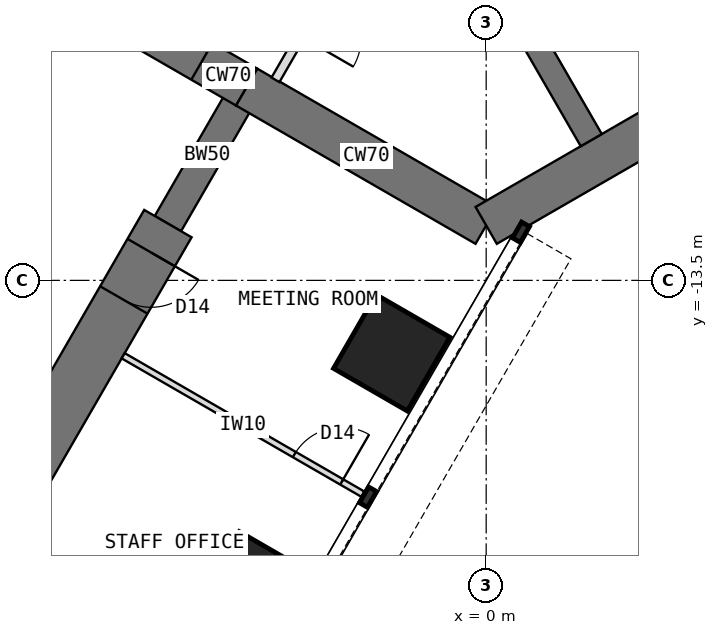
"""IFC4 building model, lengths in metres.
Left out: names, types, materials, properties, quantities, classifications, styles, units other than length and angle.
Written with IfcOpenShell. Run it as: python <this file> out.ifc"""

import sys

from ifc_helpers import new_model, si_unit, direction, frame, frame_2d, origin, origin_2d, place, context, subcontext, project, spatial, rectangle, extrude, element, fill, save


model = new_model("IFC4")
c1 = context("Model", 3, precision=1e-05, world=origin(), true_north=direction((0.0, 1.0)))
c2 = subcontext(c1, "Body", "Model", "MODEL_VIEW")
j1 = project(units=[si_unit("LENGTHUNIT", "METRE"), si_unit("PLANEANGLEUNIT", "RADIAN")], contexts=[c1])
p1 = place(None, origin())
s1 = spatial("IfcSite", under=j1, at=p1, CompositionType="ELEMENT")
p2 = place(p1, origin())
s2 = spatial("IfcBuilding", under=s1, at=p2, CompositionType="ELEMENT")
p3 = place(p2, frame((0.0, 0.0, 88.5)))
s3 = spatial("IfcBuildingStorey", under=s2, at=p3, CompositionType="ELEMENT", Elevation=88.5)
p4 = place(p3, frame((-6.97, -8.572, 0.0), z_axis=(0.0, 0.0, 1.0), x_axis=(0.866019471182, -0.500010275428, 0.0)))
e1 = element("IfcWall", 1, at=p4, inside=s3, PredefinedType="SHEAR", context=c2, shape_type="SweptSolid", body=[
    extrude(rectangle(XDim=3.5, YDim=0.7, at=frame_2d((1.75, 0.0))), origin(), (0.0, 0.0, 1.0), 4.0),
])
p5 = place(p4, frame((0.85, 0.0, 0.0)))
e2 = element("IfcOpeningElement", 2, at=p5, cuts=e1, PredefinedType="OPENING", context=c2, shape_type="SweptSolid", body=[
    extrude(rectangle(XDim=1.8, YDim=2.1, at=frame_2d((0.9, 1.05))), frame((0.0, 0.36, 0.0), z_axis=(0.0, -1.0, 0.0), x_axis=(1.0, 0.0, 0.0)), (0.0, 0.0, 1.0), 0.72),
])
p6 = place(p3, frame((-3.939, -10.322, 0.0), z_axis=(0.0, 0.0, 1.0), x_axis=(0.866011268655, -0.500024481964, 0.0)))
e3 = element("IfcWall", 3, at=p6, inside=s3, PredefinedType="SHEAR", context=c2, shape_type="SweptSolid", body=[
    extrude(rectangle(XDim=4.548, YDim=0.7, at=frame_2d((2.274, 0.0))), origin(), (0.0, 0.0, 1.0), 4.0),
])
p7 = place(p3, frame((0.0, -12.596, 0.0), z_axis=(0.0, 0.0, 1.0), x_axis=(0.866021940709, 0.500005998175, 0.0)))
e4 = element("IfcWall", 4, at=p7, inside=s3, PredefinedType="SHEAR", context=c2, shape_type="SweptSolid", body=[
    extrude(rectangle(XDim=12.596, YDim=0.7, at=frame_2d((6.298, 0.0))), origin(), (0.0, 0.0, 1.0), 4.0),
])
p8 = place(p3, frame((-3.939, -10.322, 0.0), z_axis=(0.0, 0.0, 1.0), x_axis=(-0.499918158782, -0.866072649678, 0.0)))
e5 = element("IfcWall", 5, at=p8, inside=s3, PredefinedType="SHEAR", context=c2, shape_type="SweptSolid", body=[
    extrude(rectangle(XDim=2.592, YDim=0.5, at=frame_2d((1.296, 0.0))), origin(), (0.0, 0.0, 1.0), 4.0),
])
p9 = place(p3, frame((-5.234, -12.566, 0.0), z_axis=(0.0, 0.0, 1.0), x_axis=(-0.499997557548, -0.86602681393, 0.0)))
e6 = element("IfcWall", 6, at=p9, inside=s3, PredefinedType="SHEAR", context=c2, shape_type="SweptSolid", body=[
    extrude(rectangle(XDim=9.5, YDim=0.9, at=frame_2d((4.75, 0.0))), origin(), (0.0, 0.0, 1.0), 4.0),
])
p10 = place(p9, frame((0.55, 0.0, 0.0)))
e7 = element("IfcOpeningElement", 7, at=p10, cuts=e6, PredefinedType="OPENING", context=c2, shape_type="SweptSolid", body=[
    extrude(rectangle(XDim=0.9, YDim=2.1, at=frame_2d((0.45, 1.05))), frame((0.0, 0.46, 0.0), z_axis=(0.0, -1.0, 0.0), x_axis=(1.0, 0.0, 0.0)), (0.0, 0.0, 1.0), 0.92),
])
p11 = place(p9, frame((7.3, 0.0, 0.0)))
e8 = element("IfcOpeningElement", 8, at=p11, cuts=e6, PredefinedType="OPENING", context=c2, shape_type="SweptSolid", body=[
    extrude(rectangle(XDim=0.9, YDim=2.1, at=frame_2d((0.45, 1.05))), frame((0.0, 0.46, 0.0), z_axis=(0.0, -1.0, 0.0), x_axis=(1.0, 0.0, 0.0)), (0.0, 0.0, 1.0), 0.92),
])
p12 = place(p3, frame((-6.97, -8.572, 0.0), z_axis=(0.0, 0.0, 1.0), x_axis=(-0.499988811324, -0.866031863473, 0.0)))
e9 = element("IfcWall", 9, at=p12, inside=s3, PredefinedType="SHEAR", context=c2, shape_type="SweptSolid", body=[
    extrude(rectangle(XDim=2.592, YDim=0.5, at=frame_2d((1.296, 0.0))), origin(), (0.0, 0.0, 1.0), 4.0),
])
for number, where, z_axis, x_axis in (
    (10, (-1.554, -14.691, 0.0), (0.0, 0.0, 1.0), (0.5, 0.866, 0.0)),
    (11, (-3.804, -18.588, 0.0), (0.0, 0.0, 1.0), (0.5, 0.866, 0.0)),
):
    element("IfcColumn", number, at=place(p3, frame(where, z_axis=z_axis, x_axis=x_axis)), inside=s3, PredefinedType="COLUMN", context=c2, shape_type="SweptSolid", body=[
        extrude(rectangle(XDim=1.4, YDim=1.4, at=origin_2d()), origin(), (0.0, 0.0, 1.0), 4.0),
    ])
p13 = place(p3, frame((-1.201, -6.12, 0.0), z_axis=(0.0, 0.0, 1.0), x_axis=(0.500002627198, -0.866023886965, 0.0)))
e12 = element("IfcWall", 12, at=p13, inside=s3, PredefinedType="SHEAR", context=c2, shape_type="SweptSolid", body=[
    extrude(rectangle(XDim=5.858, YDim=0.4, at=frame_2d((2.929, 0.0))), origin(), (0.0, 0.0, 1.0), 4.0),
])
p14 = place(p3, frame((-5.97, -14.74, 0.0), z_axis=(0.0, 0.0, 1.0), x_axis=(0.866035472144, -0.499982560684, 0.0)))
e13 = element("IfcWall", 13, at=p14, inside=s3, PredefinedType="PARTITIONING", context=c2, shape_type="SweptSolid", body=[
    extrude(rectangle(XDim=4.55, YDim=0.1, at=frame_2d((2.275, 0.0))), origin(), (0.0, 0.0, 1.0), 3.7),
])
p15 = place(p14, frame((3.25, 0.0, 0.0)))
e14 = element("IfcOpeningElement", 14, at=p15, cuts=e13, PredefinedType="OPENING", context=c2, shape_type="SweptSolid", body=[
    extrude(rectangle(XDim=0.9, YDim=2.1, at=frame_2d((0.45, 1.05))), frame((0.0, 0.06, 0.0), z_axis=(0.0, -1.0, 0.0), x_axis=(1.0, 0.0, 0.0)), (0.0, 0.0, 1.0), 0.12),
])
p16 = place(p3, frame((-1.253, -6.37, 0.0), z_axis=(0.0, 0.0, 1.0), x_axis=(-0.500007369519, -0.866021148949, 0.0)))
e15 = element("IfcWall", 15, at=p16, inside=s3, PredefinedType="PARTITIONING", context=c2, shape_type="SweptSolid", body=[
    extrude(rectangle(XDim=4.426, YDim=0.15, at=frame_2d((2.213, 0.0))), origin(), (0.0, 0.0, 1.0), 3.7),
])
p17 = place(p16, frame((2.598, 0.0, 0.0)))
e16 = element("IfcOpeningElement", 16, at=p17, cuts=e15, PredefinedType="OPENING", context=c2, shape_type="SweptSolid", body=[
    extrude(rectangle(XDim=1.0, YDim=2.1, at=frame_2d((0.5, 1.05))), frame((0.0, 0.085, 0.0), z_axis=(0.0, -1.0, 0.0), x_axis=(1.0, 0.0, 0.0)), (0.0, 0.0, 1.0), 0.17),
])
p18 = place(p5, origin())
e17 = element("IfcDoor", 17, at=p18, inside=s3, OperationType="DOUBLE_DOOR_DOUBLE_SWING", PredefinedType="DOOR", context=c2, shape_type="SweptSolid", body=[
    extrude(rectangle(XDim=1.72, YDim=2.06, at=frame_2d((0.9, 1.03))), frame((0.0, 0.025, 0.0), z_axis=(0.0, -1.0, 0.0), x_axis=(1.0, 0.0, 0.0)), (0.0, 0.0, 1.0), 0.05),
    extrude(rectangle(XDim=0.04, YDim=2.1, at=frame_2d((0.02, 1.05))), frame((0.0, 0.35, 0.0), z_axis=(0.0, -1.0, 0.0), x_axis=(1.0, 0.0, 0.0)), (0.0, 0.0, 1.0), 0.699),
    extrude(rectangle(XDim=0.04, YDim=2.1, at=frame_2d((1.78, 1.05))), frame((0.0, 0.35, 0.0), z_axis=(0.0, -1.0, 0.0), x_axis=(1.0, 0.0, 0.0)), (0.0, 0.0, 1.0), 0.699),
    extrude(rectangle(XDim=1.72, YDim=0.04, at=frame_2d((0.9, 2.08))), frame((0.0, 0.35, 0.0), z_axis=(0.0, -1.0, 0.0), x_axis=(1.0, 0.0, 0.0)), (0.0, 0.0, 1.0), 0.699),
])
fill(e2, e17)
p19 = place(p15, origin())
e18 = element("IfcDoor", 18, at=p19, inside=s3, OperationType="SINGLE_SWING_RIGHT", PredefinedType="DOOR", context=c2, shape_type="SweptSolid", body=[
    extrude(rectangle(XDim=0.9, YDim=2.1, at=frame_2d((0.45, 1.05))), frame((0.0, 0.025, 0.0), z_axis=(0.0, -1.0, 0.0), x_axis=(1.0, 0.0, 0.0)), (0.0, 0.0, 1.0), 0.05),
])
fill(e14, e18)
p20 = place(p10, origin())
e19 = element("IfcDoor", 19, at=p20, inside=s3, OperationType="SINGLE_SWING_LEFT", PredefinedType="DOOR", context=c2, shape_type="SweptSolid", body=[
    extrude(rectangle(XDim=0.82, YDim=2.06, at=frame_2d((0.45, 1.03))), frame((0.0, 0.025, 0.0), z_axis=(0.0, -1.0, 0.0), x_axis=(1.0, 0.0, 0.0)), (0.0, 0.0, 1.0), 0.05),
    extrude(rectangle(XDim=0.04, YDim=2.1, at=frame_2d((0.02, 1.05))), frame((0.0, 0.45, 0.0), z_axis=(0.0, -1.0, 0.0), x_axis=(1.0, 0.0, 0.0)), (0.0, 0.0, 1.0), 0.899),
    extrude(rectangle(XDim=0.04, YDim=2.1, at=frame_2d((0.88, 1.05))), frame((0.0, 0.45, 0.0), z_axis=(0.0, -1.0, 0.0), x_axis=(1.0, 0.0, 0.0)), (0.0, 0.0, 1.0), 0.899),
    extrude(rectangle(XDim=0.82, YDim=0.04, at=frame_2d((0.45, 2.08))), frame((0.0, 0.45, 0.0), z_axis=(0.0, -1.0, 0.0), x_axis=(1.0, 0.0, 0.0)), (0.0, 0.0, 1.0), 0.899),
])
fill(e7, e19)
save(model, sys.argv[1])
